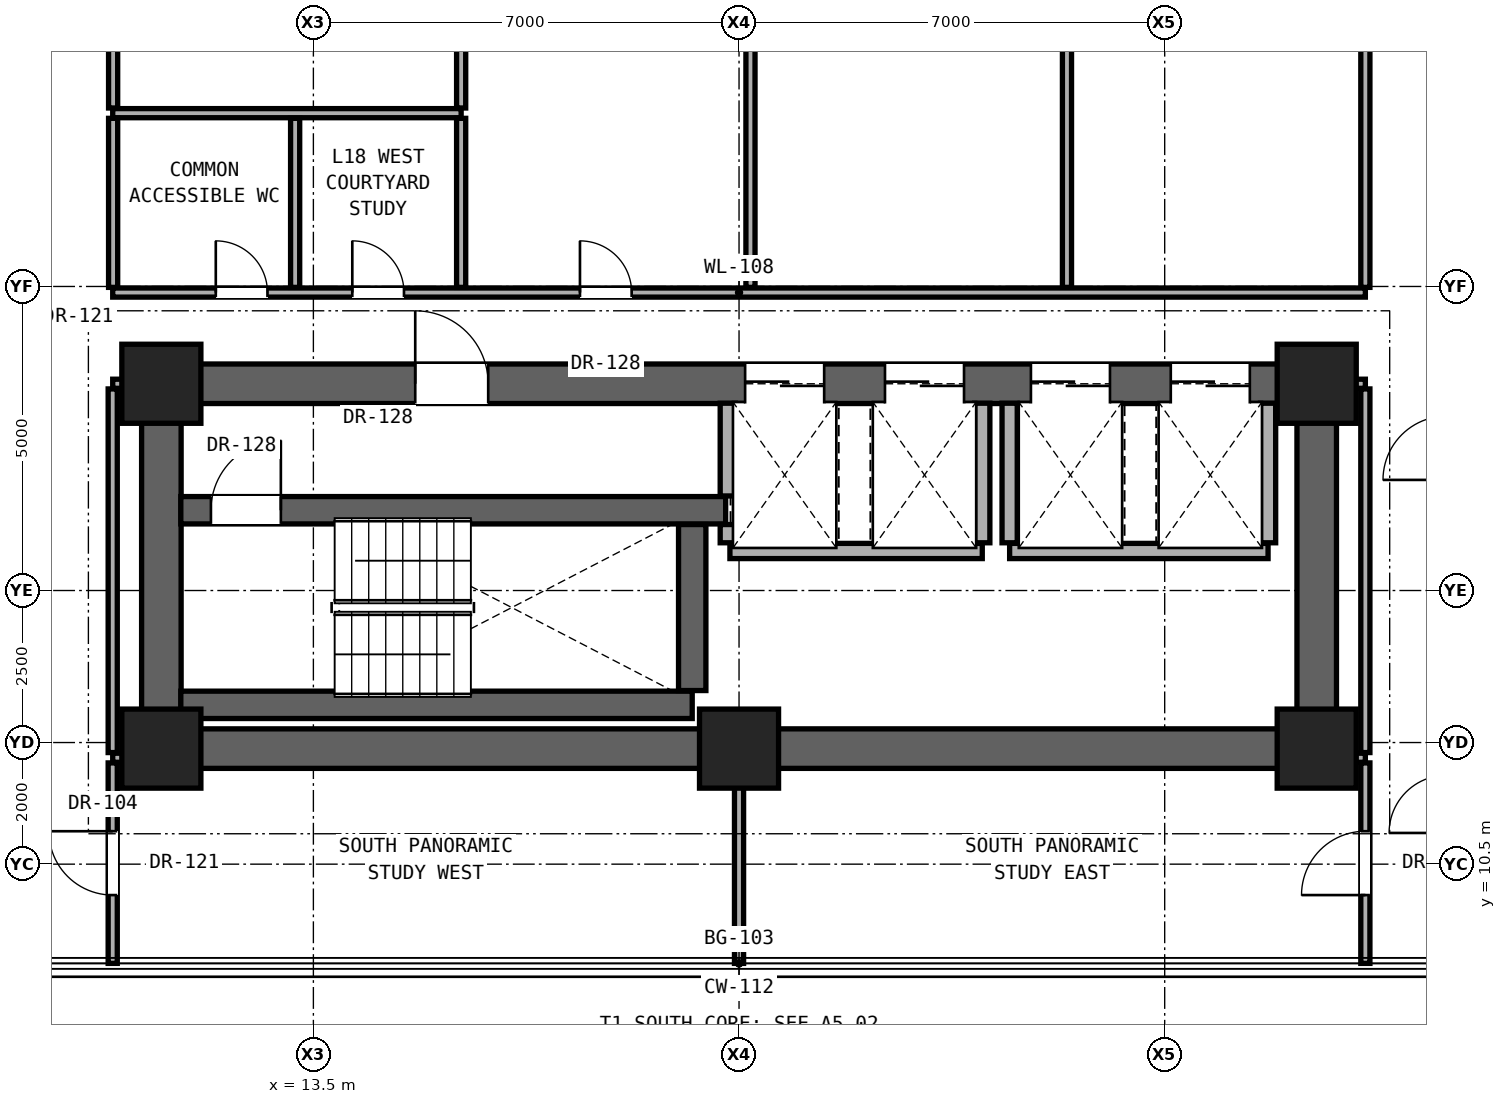
"""IFC4 building model, lengths in metres.
Left out: names, types, materials, properties, quantities, classifications, styles, units other than length and angle.
Written with IfcOpenShell. Run it as: python <this file> out.ifc"""

import sys

from ifc_helpers import new_model, si_unit, direction, frame, frame_2d, origin, origin_2d, place, context, subcontext, project, spatial, rectangle, extrude, element, fill, save


model = new_model("IFC4")
c1 = context("Model", 3, precision=1e-05, world=origin(), true_north=direction((0.0, 1.0)))
c2 = subcontext(c1, "Body", "Model", "MODEL_VIEW")
j1 = project(units=[si_unit("LENGTHUNIT", "METRE"), si_unit("PLANEANGLEUNIT", "RADIAN")], contexts=[c1])
p1 = place(None, origin())
s1 = spatial("IfcSite", under=j1, at=p1, CompositionType="ELEMENT")
p2 = place(p1, origin())
s2 = spatial("IfcBuilding", under=s1, at=p2, CompositionType="ELEMENT")
p3 = place(p2, frame((0.0, 0.0, 65.3)))
s3 = spatial("IfcBuildingStorey", under=s2, at=p3, CompositionType="ELEMENT", Elevation=65.3)
for number, where, z_axis, x_axis in (
    (1, (11.0, 12.4, 0.0), (0.0, 0.0, 1.0), (1.0, 0.0, 0.0)),
    (2, (20.5, 12.4, 0.0), (0.0, 0.0, 1.0), (1.0, 0.0, 0.0)),
    (3, (30.0, 12.4, 0.0), (0.0, 0.0, 1.0), (1.0, 0.0, 0.0)),
    (4, (11.0, 18.4, 0.0), (0.0, 0.0, 1.0), (1.0, 0.0, 0.0)),
    (5, (30.0, 18.4, 0.0), (0.0, 0.0, 1.0), (1.0, 0.0, 0.0)),
):
    element("IfcColumn", number, at=place(p3, frame(where, z_axis=z_axis, x_axis=x_axis)), inside=s3, PredefinedType="COLUMN", context=c2, shape_type="SweptSolid", body=[
        extrude(rectangle(XDim=1.3, YDim=1.3, at=origin_2d()), origin(), (0.0, 0.0, 1.0), 3.3),
    ])
p4 = place(p3, frame((11.0, 12.4, 0.0), z_axis=(0.0, 0.0, 1.0), x_axis=(1.0, 0.0, 0.0)))
e6 = element("IfcWall", 6, at=p4, inside=s3, PredefinedType="SHEAR", context=c2, shape_type="SweptSolid", body=[
    extrude(rectangle(XDim=19.0, YDim=0.65, at=frame_2d((9.5, 0.0))), origin(), (0.0, 0.0, 1.0), 3.06),
])
for number, where, z_axis, x_axis in (
    (7, (11.0, 12.4, 0.0), (0.0, 0.0, 1.0), (0.0, 1.0, 0.0)),
    (8, (30.0, 12.4, 0.0), (0.0, 0.0, 1.0), (0.0, 1.0, 0.0)),
):
    element("IfcWall", number, at=place(p3, frame(where, z_axis=z_axis, x_axis=x_axis)), inside=s3, PredefinedType="SHEAR", context=c2, shape_type="SweptSolid", body=[
        extrude(rectangle(XDim=6.0, YDim=0.65, at=frame_2d((3.0, 0.0))), origin(), (0.0, 0.0, 1.0), 3.06),
    ])
p5 = place(p3, frame((11.0, 18.4, 0.0), z_axis=(0.0, 0.0, 1.0), x_axis=(1.0, 0.0, 0.0)))
e9 = element("IfcWall", 9, at=p5, inside=s3, PredefinedType="SHEAR", context=c2, shape_type="SweptSolid", body=[
    extrude(rectangle(XDim=19.0, YDim=0.65, at=frame_2d((9.5, 0.0))), origin(), (0.0, 0.0, 1.0), 3.06),
])
p6 = place(p5, frame((4.175, 0.0, 0.0)))
e10 = element("IfcOpeningElement", 10, at=p6, cuts=e9, PredefinedType="OPENING", context=c2, shape_type="SweptSolid", body=[
    extrude(rectangle(XDim=1.2, YDim=2.25, at=frame_2d((0.6, 1.125))), frame((0.0, 0.335, 0.0), z_axis=(0.0, -1.0, 0.0), x_axis=(1.0, 0.0, 0.0)), (0.0, 0.0, 1.0), 0.67),
])
p7 = place(p5, frame((9.6, 0.0, 0.0)))
e11 = element("IfcOpeningElement", 11, at=p7, cuts=e9, PredefinedType="OPENING", context=c2, shape_type="SweptSolid", body=[
    extrude(rectangle(XDim=1.3, YDim=2.3, at=frame_2d((0.65, 1.15))), frame((0.0, 0.335, 0.0), z_axis=(0.0, -1.0, 0.0), x_axis=(1.0, 0.0, 0.0)), (0.0, 0.0, 1.0), 0.67),
])
p8 = place(p5, frame((11.9, 0.0, 0.0)))
e12 = element("IfcOpeningElement", 12, at=p8, cuts=e9, PredefinedType="OPENING", context=c2, shape_type="SweptSolid", body=[
    extrude(rectangle(XDim=1.3, YDim=2.3, at=frame_2d((0.65, 1.15))), frame((0.0, 0.335, 0.0), z_axis=(0.0, -1.0, 0.0), x_axis=(1.0, 0.0, 0.0)), (0.0, 0.0, 1.0), 0.67),
])
p9 = place(p5, frame((14.3, 0.0, 0.0)))
e13 = element("IfcOpeningElement", 13, at=p9, cuts=e9, PredefinedType="OPENING", context=c2, shape_type="SweptSolid", body=[
    extrude(rectangle(XDim=1.3, YDim=2.3, at=frame_2d((0.65, 1.15))), frame((0.0, 0.335, 0.0), z_axis=(0.0, -1.0, 0.0), x_axis=(1.0, 0.0, 0.0)), (0.0, 0.0, 1.0), 0.67),
])
p10 = place(p5, frame((16.6, 0.0, 0.0)))
e14 = element("IfcOpeningElement", 14, at=p10, cuts=e9, PredefinedType="OPENING", context=c2, shape_type="SweptSolid", body=[
    extrude(rectangle(XDim=1.3, YDim=2.3, at=frame_2d((0.65, 1.15))), frame((0.0, 0.335, 0.0), z_axis=(0.0, -1.0, 0.0), x_axis=(1.0, 0.0, 0.0)), (0.0, 0.0, 1.0), 0.67),
])
for number, where, z_axis, x_axis in (
    (15, (10.2, 12.25, 0.0), (0.0, 0.0, 1.0), (1.0, 0.0, 0.0)),
    (16, (30.32, 12.25, 0.0), (0.0, 0.0, 1.0), (1.0, 0.0, 0.0)),
):
    element("IfcWall", number, at=place(p3, frame(where, z_axis=z_axis, x_axis=x_axis)), inside=s3, PredefinedType="PARTITIONING", context=c2, shape_type="SweptSolid", body=[
        extrude(rectangle(XDim=0.48, YDim=0.15, at=frame_2d((0.24, 0.0))), origin(), (0.0, 0.0, 1.0), 3.06),
    ])
p11 = place(p3, frame((11.32, 13.12, 0.0), z_axis=(0.0, 0.0, 1.0), x_axis=(1.0, 0.0, 0.0)))
e17 = element("IfcWall", 17, at=p11, inside=s3, PredefinedType="SHEAR", context=c2, shape_type="SweptSolid", body=[
    extrude(rectangle(XDim=8.41, YDim=0.45, at=frame_2d((4.205, 0.0))), origin(), (0.0, 0.0, 1.0), 3.06),
])
p12 = place(p3, frame((20.35, 15.65, 0.0), z_axis=(0.0, 0.0, 1.0), x_axis=(1.0, 0.0, 0.0)))
e18 = element("IfcWall", 18, at=p12, inside=s3, PredefinedType="SOLIDWALL", context=c2, shape_type="SweptSolid", body=[
    extrude(rectangle(XDim=4.15, YDim=0.25, at=frame_2d((2.075, 0.0))), origin(), (0.0, 0.0, 1.0), 3.06),
])
p13 = place(p3, frame((24.95, 15.65, 0.0), z_axis=(0.0, 0.0, 1.0), x_axis=(1.0, 0.0, 0.0)))
e19 = element("IfcWall", 19, at=p13, inside=s3, PredefinedType="SOLIDWALL", context=c2, shape_type="SweptSolid", body=[
    extrude(rectangle(XDim=4.25, YDim=0.25, at=frame_2d((2.125, 0.0))), origin(), (0.0, 0.0, 1.0), 3.06),
])
p14 = place(p3, frame((11.32, 16.32, 0.0), z_axis=(0.0, 0.0, 1.0), x_axis=(1.0, 0.0, 0.0)))
e20 = element("IfcWall", 20, at=p14, inside=s3, PredefinedType="SHEAR", context=c2, shape_type="SweptSolid", body=[
    extrude(rectangle(XDim=8.96, YDim=0.45, at=frame_2d((4.48, 0.0))), origin(), (0.0, 0.0, 1.0), 3.06),
])
p15 = place(p14, frame((0.495, 0.0, 0.0)))
e21 = element("IfcOpeningElement", 21, at=p15, cuts=e20, PredefinedType="OPENING", context=c2, shape_type="SweptSolid", body=[
    extrude(rectangle(XDim=1.15, YDim=2.2, at=frame_2d((0.575, 1.1))), frame((0.0, 0.235, 0.0), z_axis=(0.0, -1.0, 0.0), x_axis=(1.0, 0.0, 0.0)), (0.0, 0.0, 1.0), 0.47),
])
for number, where, z_axis, x_axis in (
    (22, (10.2, 18.4, 0.0), (0.0, 0.0, 1.0), (1.0, 0.0, 0.0)),
    (23, (30.32, 18.4, 0.0), (0.0, 0.0, 1.0), (1.0, 0.0, 0.0)),
):
    element("IfcWall", number, at=place(p3, frame(where, z_axis=z_axis, x_axis=x_axis)), inside=s3, PredefinedType="PARTITIONING", context=c2, shape_type="SweptSolid", body=[
        extrude(rectangle(XDim=0.48, YDim=0.15, at=frame_2d((0.24, 0.0))), origin(), (0.0, 0.0, 1.0), 2.436),
    ])
p16 = place(p3, frame((10.2, 19.9, 0.0), z_axis=(0.0, 0.0, 1.0), x_axis=(1.0, 0.0, 0.0)))
e24 = element("IfcWall", 24, at=p16, inside=s3, PredefinedType="PARTITIONING", context=c2, shape_type="SweptSolid", body=[
    extrude(rectangle(XDim=20.6, YDim=0.15, at=frame_2d((10.3, 0.0))), origin(), (0.0, 0.0, 1.0), 2.104),
])
p17 = place(p16, frame((1.695, 0.0, 0.0)))
e25 = element("IfcOpeningElement", 25, at=p17, cuts=e24, PredefinedType="OPENING", context=c2, shape_type="SweptSolid", body=[
    extrude(rectangle(XDim=0.85, YDim=2.01, at=frame_2d((0.425, 1.005))), frame((0.0, 0.085, 0.0), z_axis=(0.0, -1.0, 0.0), x_axis=(1.0, 0.0, 0.0)), (0.0, 0.0, 1.0), 0.17),
])
p18 = place(p16, frame((3.94, 0.0, 0.0)))
e26 = element("IfcOpeningElement", 26, at=p18, cuts=e24, PredefinedType="OPENING", context=c2, shape_type="SweptSolid", body=[
    extrude(rectangle(XDim=0.85, YDim=2.01, at=frame_2d((0.425, 1.005))), frame((0.0, 0.085, 0.0), z_axis=(0.0, -1.0, 0.0), x_axis=(1.0, 0.0, 0.0)), (0.0, 0.0, 1.0), 0.17),
])
p19 = place(p16, frame((7.684, 0.0, 0.0)))
e27 = element("IfcOpeningElement", 27, at=p19, cuts=e24, PredefinedType="OPENING", context=c2, shape_type="SweptSolid", body=[
    extrude(rectangle(XDim=0.85, YDim=2.01, at=frame_2d((0.425, 1.005))), frame((0.0, 0.085, 0.0), z_axis=(0.0, -1.0, 0.0), x_axis=(1.0, 0.0, 0.0)), (0.0, 0.0, 1.0), 0.17),
])
p20 = place(p3, frame((10.2, 22.85, 0.0), z_axis=(0.0, 0.0, 1.0), x_axis=(1.0, 0.0, 0.0)))
e28 = element("IfcWall", 28, at=p20, inside=s3, PredefinedType="PARTITIONING", context=c2, shape_type="SweptSolid", body=[
    extrude(rectangle(XDim=5.73, YDim=0.15, at=frame_2d((2.865, 0.0))), origin(), (0.0, 0.0, 1.0), 2.104),
])
p21 = place(p3, frame((10.2, 8.868, 0.0), z_axis=(0.0, 0.0, 1.0), x_axis=(0.0, 1.0, 0.0)))
e29 = element("IfcWall", 29, at=p21, inside=s3, PredefinedType="PARTITIONING", context=c2, shape_type="SweptSolid", body=[
    extrude(rectangle(XDim=3.297, YDim=0.15, at=frame_2d((1.648, 0.0))), origin(), (0.0, 0.0, 1.0), 3.06),
])
p22 = place(p21, frame((1.124, 0.0, 0.0)))
e30 = element("IfcOpeningElement", 30, at=p22, cuts=e29, PredefinedType="OPENING", context=c2, shape_type="SweptSolid", body=[
    extrude(rectangle(XDim=1.05, YDim=2.2, at=frame_2d((0.525, 1.1))), frame((0.0, 0.085, 0.0), z_axis=(0.0, -1.0, 0.0), x_axis=(1.0, 0.0, 0.0)), (0.0, 0.0, 1.0), 0.17),
])
p23 = place(p3, frame((10.2, 12.335, 0.0), z_axis=(0.0, 0.0, 1.0), x_axis=(0.0, 1.0, 0.0)))
e31 = element("IfcWall", 31, at=p23, inside=s3, PredefinedType="PARTITIONING", context=c2, shape_type="SweptSolid", body=[
    extrude(rectangle(XDim=5.98, YDim=0.15, at=frame_2d((2.99, 0.0))), origin(), (0.0, 0.0, 1.0), 2.436),
])
p24 = place(p3, frame((10.207, 19.985, 0.0), z_axis=(0.0, 0.0, 1.0), x_axis=(0.0, 1.0, 0.0)))
e32 = element("IfcWall", 32, at=p24, inside=s3, PredefinedType="PARTITIONING", context=c2, shape_type="SweptSolid", body=[
    extrude(rectangle(XDim=2.78, YDim=0.15, at=frame_2d((1.39, 0.0))), origin(), (0.0, 0.0, 1.0), 3.06),
])
p25 = place(p3, frame((10.207, 22.935, 0.0), z_axis=(0.0, 0.0, 1.0), x_axis=(0.0, 1.0, 0.0)))
e33 = element("IfcWall", 33, at=p25, inside=s3, PredefinedType="PARTITIONING", context=c2, shape_type="SweptSolid", body=[
    extrude(rectangle(XDim=10.08, YDim=0.15, at=frame_2d((5.04, 0.0))), origin(), (0.0, 0.0, 1.0), 2.279),
])
p26 = place(p25, frame((4.565, 0.0, 0.0)))
e34 = element("IfcOpeningElement", 34, at=p26, cuts=e33, PredefinedType="OPENING", context=c2, shape_type="SweptSolid", body=[
    extrude(rectangle(XDim=0.95, YDim=2.15, at=frame_2d((0.475, 1.075))), frame((0.0, 0.085, 0.0), z_axis=(0.0, -1.0, 0.0), x_axis=(1.0, 0.0, 0.0)), (0.0, 0.0, 1.0), 0.17),
])
p27 = place(p3, frame((13.2, 19.985, 0.0), z_axis=(0.0, 0.0, 1.0), x_axis=(0.0, 1.0, 0.0)))
e35 = element("IfcWall", 35, at=p27, inside=s3, PredefinedType="PARTITIONING", context=c2, shape_type="SweptSolid", body=[
    extrude(rectangle(XDim=2.78, YDim=0.15, at=frame_2d((1.39, 0.0))), origin(), (0.0, 0.0, 1.0), 3.06),
])
p28 = place(p3, frame((15.93, 19.985, 0.0), z_axis=(0.0, 0.0, 1.0), x_axis=(0.0, 1.0, 0.0)))
e36 = element("IfcWall", 36, at=p28, inside=s3, PredefinedType="PARTITIONING", context=c2, shape_type="SweptSolid", body=[
    extrude(rectangle(XDim=2.78, YDim=0.15, at=frame_2d((1.39, 0.0))), origin(), (0.0, 0.0, 1.0), 2.589),
])
p29 = place(p3, frame((15.93, 22.935, 0.0), z_axis=(0.0, 0.0, 1.0), x_axis=(0.0, 1.0, 0.0)))
e37 = element("IfcWall", 37, at=p29, inside=s3, PredefinedType="PARTITIONING", context=c2, shape_type="SweptSolid", body=[
    extrude(rectangle(XDim=10.08, YDim=0.15, at=frame_2d((5.04, 0.0))), origin(), (0.0, 0.0, 1.0), 2.104),
])
p30 = place(p3, frame((19.73, 13.355, 0.0), z_axis=(0.0, 0.0, 1.0), x_axis=(0.0, 1.0, 0.0)))
e38 = element("IfcWall", 38, at=p30, inside=s3, PredefinedType="SHEAR", context=c2, shape_type="SweptSolid", body=[
    extrude(rectangle(XDim=2.73, YDim=0.45, at=frame_2d((1.365, 0.0))), origin(), (0.0, 0.0, 1.0), 3.06),
])
p31 = place(p3, frame((20.315, 15.785, 0.0), z_axis=(0.0, 0.0, 1.0), x_axis=(0.0, 1.0, 0.0)))
e39 = element("IfcWall", 39, at=p31, inside=s3, PredefinedType="SOLIDWALL", context=c2, shape_type="SweptSolid", body=[
    extrude(rectangle(XDim=0.3, YDim=0.25, at=frame_2d((0.15, 0.0))), origin(), (0.0, 0.0, 1.0), 3.06),
])
p32 = place(p3, frame((20.315, 16.555, 0.0), z_axis=(0.0, 0.0, 1.0), x_axis=(0.0, 1.0, 0.0)))
e40 = element("IfcWall", 40, at=p32, inside=s3, PredefinedType="SOLIDWALL", context=c2, shape_type="SweptSolid", body=[
    extrude(rectangle(XDim=1.525, YDim=0.25, at=frame_2d((0.763, 0.0))), origin(), (0.0, 0.0, 1.0), 3.06),
])
p33 = place(p3, frame((20.5, 8.868, 0.0), z_axis=(0.0, 0.0, 1.0), x_axis=(0.0, 1.0, 0.0)))
e41 = element("IfcWall", 41, at=p33, inside=s3, PredefinedType="PARTITIONING", context=c2, shape_type="SweptSolid", body=[
    extrude(rectangle(XDim=3.212, YDim=0.15, at=frame_2d((1.606, 0.0))), origin(), (0.0, 0.0, 1.0), 3.06),
])
p34 = place(p3, frame((20.688, 19.985, 0.0), z_axis=(0.0, 0.0, 1.0), x_axis=(0.0, 1.0, 0.0)))
e42 = element("IfcWall", 42, at=p34, inside=s3, PredefinedType="PARTITIONING", context=c2, shape_type="SweptSolid", body=[
    extrude(rectangle(XDim=13.03, YDim=0.15, at=frame_2d((6.515, 0.0))), origin(), (0.0, 0.0, 1.0), 2.104),
])
for number, where, z_axis, x_axis in (
    (43, (24.5, 15.785, 0.0), (0.0, 0.0, 1.0), (0.0, 1.0, 0.0)),
    (44, (24.95, 15.785, 0.0), (0.0, 0.0, 1.0), (0.0, 1.0, 0.0)),
):
    element("IfcWall", number, at=place(p3, frame(where, z_axis=z_axis, x_axis=x_axis)), inside=s3, PredefinedType="SOLIDWALL", context=c2, shape_type="SweptSolid", body=[
        extrude(rectangle(XDim=2.295, YDim=0.25, at=frame_2d((1.147, 0.0))), origin(), (0.0, 0.0, 1.0), 3.06),
    ])
p35 = place(p3, frame((25.893, 19.985, 0.0), z_axis=(0.0, 0.0, 1.0), x_axis=(0.0, 1.0, 0.0)))
e45 = element("IfcWall", 45, at=p35, inside=s3, PredefinedType="PARTITIONING", context=c2, shape_type="SweptSolid", body=[
    extrude(rectangle(XDim=13.03, YDim=0.15, at=frame_2d((6.515, 0.0))), origin(), (0.0, 0.0, 1.0), 2.104),
])
p36 = place(p3, frame((29.2, 15.785, 0.0), z_axis=(0.0, 0.0, 1.0), x_axis=(0.0, 1.0, 0.0)))
e46 = element("IfcWall", 46, at=p36, inside=s3, PredefinedType="SOLIDWALL", context=c2, shape_type="SweptSolid", body=[
    extrude(rectangle(XDim=2.295, YDim=0.25, at=frame_2d((1.147, 0.0))), origin(), (0.0, 0.0, 1.0), 3.06),
])
p37 = place(p3, frame((30.8, 8.868, 0.0), z_axis=(0.0, 0.0, 1.0), x_axis=(0.0, 1.0, 0.0)))
e47 = element("IfcWall", 47, at=p37, inside=s3, PredefinedType="PARTITIONING", context=c2, shape_type="SweptSolid", body=[
    extrude(rectangle(XDim=3.297, YDim=0.15, at=frame_2d((1.648, 0.0))), origin(), (0.0, 0.0, 1.0), 3.06),
])
p38 = place(p37, frame((1.124, 0.0, 0.0)))
e48 = element("IfcOpeningElement", 48, at=p38, cuts=e47, PredefinedType="OPENING", context=c2, shape_type="SweptSolid", body=[
    extrude(rectangle(XDim=1.05, YDim=2.2, at=frame_2d((0.525, 1.1))), frame((0.0, 0.085, 0.0), z_axis=(0.0, -1.0, 0.0), x_axis=(1.0, 0.0, 0.0)), (0.0, 0.0, 1.0), 0.17),
])
p39 = place(p3, frame((30.8, 12.335, 0.0), z_axis=(0.0, 0.0, 1.0), x_axis=(0.0, 1.0, 0.0)))
e49 = element("IfcWall", 49, at=p39, inside=s3, PredefinedType="PARTITIONING", context=c2, shape_type="SweptSolid", body=[
    extrude(rectangle(XDim=5.98, YDim=0.15, at=frame_2d((2.99, 0.0))), origin(), (0.0, 0.0, 1.0), 2.436),
])
p40 = place(p3, frame((30.8, 19.985, 0.0), z_axis=(0.0, 0.0, 1.0), x_axis=(0.0, 1.0, 0.0)))
e50 = element("IfcWall", 50, at=p40, inside=s3, PredefinedType="PARTITIONING", context=c2, shape_type="SweptSolid", body=[
    extrude(rectangle(XDim=13.03, YDim=0.15, at=frame_2d((6.515, 0.0))), origin(), (0.0, 0.0, 1.0), 2.279),
])
p41 = place(p6, origin())
e51 = element("IfcDoor", 51, at=p41, inside=s3, OperationType="SINGLE_SWING_LEFT", PredefinedType="DOOR", context=c2, shape_type="SweptSolid", body=[
    extrude(rectangle(XDim=1.2, YDim=2.25, at=frame_2d((0.6, 1.125))), frame((0.0, 0.025, 0.0), z_axis=(0.0, -1.0, 0.0), x_axis=(1.0, 0.0, 0.0)), (0.0, 0.0, 1.0), 0.05),
])
fill(e10, e51)
p42 = place(p15, origin())
e52 = element("IfcDoor", 52, at=p42, inside=s3, OperationType="SINGLE_SWING_RIGHT", PredefinedType="DOOR", context=c2, shape_type="SweptSolid", body=[
    extrude(rectangle(XDim=1.15, YDim=2.2, at=frame_2d((0.575, 1.1))), frame((0.0, 0.025, 0.0), z_axis=(0.0, -1.0, 0.0), x_axis=(1.0, 0.0, 0.0)), (0.0, 0.0, 1.0), 0.05),
])
fill(e21, e52)
p43 = place(p17, origin())
e53 = element("IfcDoor", 53, at=p43, inside=s3, OperationType="SINGLE_SWING_LEFT", PredefinedType="DOOR", context=c2, shape_type="SweptSolid", body=[
    extrude(rectangle(XDim=0.85, YDim=2.01, at=frame_2d((0.425, 1.005))), frame((0.0, 0.025, 0.0), z_axis=(0.0, -1.0, 0.0), x_axis=(1.0, 0.0, 0.0)), (0.0, 0.0, 1.0), 0.05),
])
fill(e25, e53)
p44 = place(p18, origin())
e54 = element("IfcDoor", 54, at=p44, inside=s3, OperationType="SINGLE_SWING_LEFT", PredefinedType="DOOR", context=c2, shape_type="SweptSolid", body=[
    extrude(rectangle(XDim=0.85, YDim=2.01, at=frame_2d((0.425, 1.005))), frame((0.0, 0.025, 0.0), z_axis=(0.0, -1.0, 0.0), x_axis=(1.0, 0.0, 0.0)), (0.0, 0.0, 1.0), 0.05),
])
fill(e26, e54)
p45 = place(p19, origin())
e55 = element("IfcDoor", 55, at=p45, inside=s3, OperationType="SINGLE_SWING_LEFT", PredefinedType="DOOR", context=c2, shape_type="SweptSolid", body=[
    extrude(rectangle(XDim=0.85, YDim=2.01, at=frame_2d((0.425, 1.005))), frame((0.0, 0.025, 0.0), z_axis=(0.0, -1.0, 0.0), x_axis=(1.0, 0.0, 0.0)), (0.0, 0.0, 1.0), 0.05),
])
fill(e27, e55)
p46 = place(p22, origin())
e56 = element("IfcDoor", 56, at=p46, inside=s3, OperationType="SINGLE_SWING_RIGHT", PredefinedType="DOOR", context=c2, shape_type="SweptSolid", body=[
    extrude(rectangle(XDim=1.05, YDim=2.2, at=frame_2d((0.525, 1.1))), frame((0.0, 0.025, 0.0), z_axis=(0.0, -1.0, 0.0), x_axis=(1.0, 0.0, 0.0)), (0.0, 0.0, 1.0), 0.05),
])
fill(e30, e56)
p47 = place(p38, origin())
e57 = element("IfcDoor", 57, at=p47, inside=s3, OperationType="SINGLE_SWING_LEFT", PredefinedType="DOOR", context=c2, shape_type="SweptSolid", body=[
    extrude(rectangle(XDim=1.05, YDim=2.2, at=frame_2d((0.525, 1.1))), frame((0.0, 0.025, 0.0), z_axis=(0.0, -1.0, 0.0), x_axis=(1.0, 0.0, 0.0)), (0.0, 0.0, 1.0), 0.05),
])
fill(e48, e57)
p48 = place(p7, origin())
e58 = element("IfcDoor", 58, at=p48, inside=s3, OperationType="DOUBLE_DOOR_SLIDING", PredefinedType="DOOR", context=c2, shape_type="SweptSolid", body=[
    extrude(rectangle(XDim=1.3, YDim=2.3, at=frame_2d((0.65, 1.15))), frame((0.0, 0.025, 0.0), z_axis=(0.0, -1.0, 0.0), x_axis=(1.0, 0.0, 0.0)), (0.0, 0.0, 1.0), 0.05),
])
fill(e11, e58)
p49 = place(p8, origin())
e59 = element("IfcDoor", 59, at=p49, inside=s3, OperationType="DOUBLE_DOOR_SLIDING", PredefinedType="DOOR", context=c2, shape_type="SweptSolid", body=[
    extrude(rectangle(XDim=1.3, YDim=2.3, at=frame_2d((0.65, 1.15))), frame((0.0, 0.025, 0.0), z_axis=(0.0, -1.0, 0.0), x_axis=(1.0, 0.0, 0.0)), (0.0, 0.0, 1.0), 0.05),
])
fill(e12, e59)
p50 = place(p9, origin())
e60 = element("IfcDoor", 60, at=p50, inside=s3, OperationType="DOUBLE_DOOR_SLIDING", PredefinedType="DOOR", context=c2, shape_type="SweptSolid", body=[
    extrude(rectangle(XDim=1.3, YDim=2.3, at=frame_2d((0.65, 1.15))), frame((0.0, 0.025, 0.0), z_axis=(0.0, -1.0, 0.0), x_axis=(1.0, 0.0, 0.0)), (0.0, 0.0, 1.0), 0.05),
])
fill(e13, e60)
p51 = place(p10, origin())
e61 = element("IfcDoor", 61, at=p51, inside=s3, OperationType="DOUBLE_DOOR_SLIDING", PredefinedType="DOOR", context=c2, shape_type="SweptSolid", body=[
    extrude(rectangle(XDim=1.3, YDim=2.3, at=frame_2d((0.65, 1.15))), frame((0.0, 0.025, 0.0), z_axis=(0.0, -1.0, 0.0), x_axis=(1.0, 0.0, 0.0)), (0.0, 0.0, 1.0), 0.05),
])
fill(e14, e61)
save(model, sys.argv[1])
